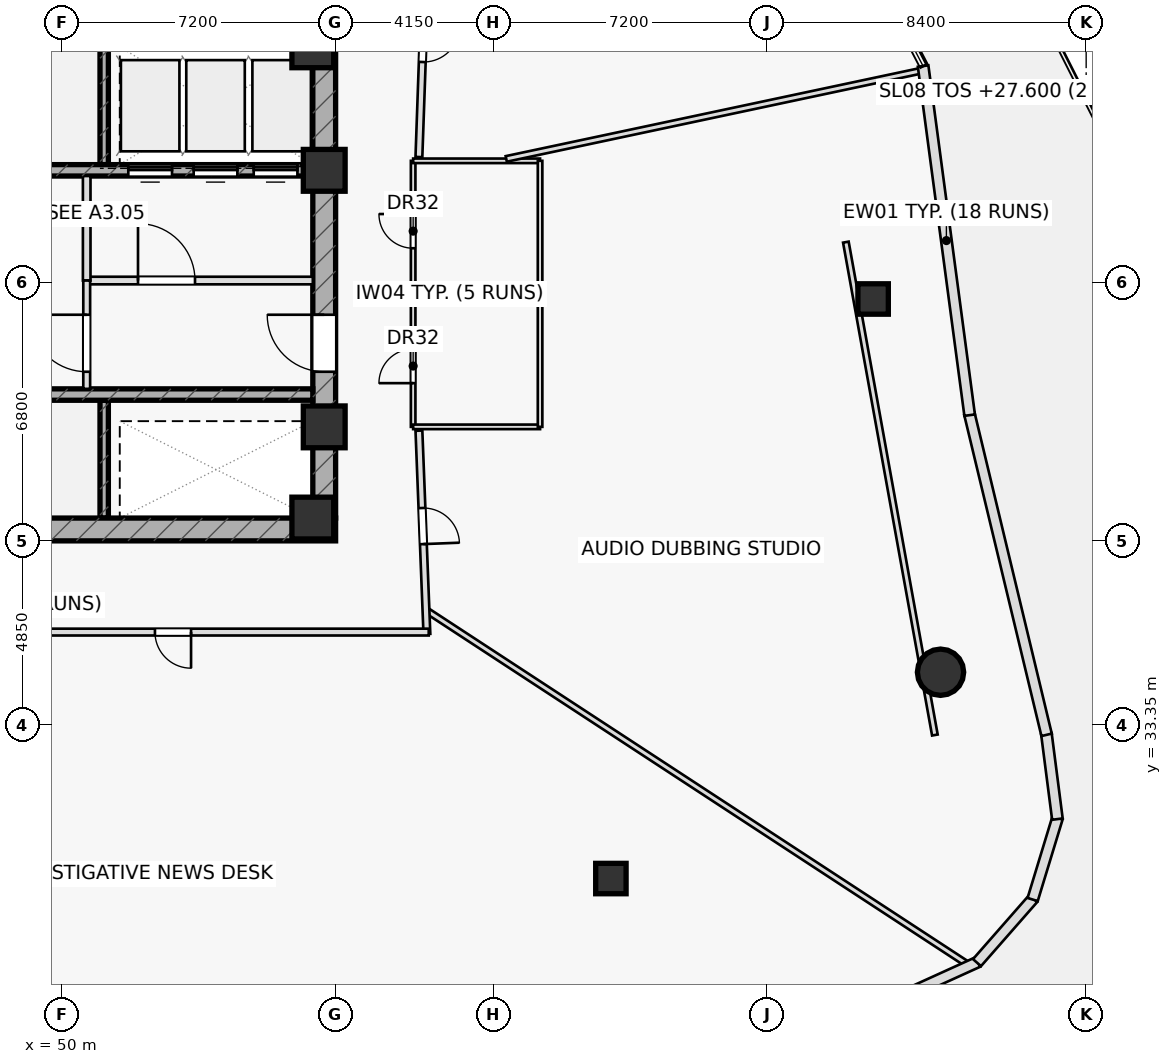
"""IFC4 building model, lengths in metres.
Left out: names, types, materials, properties, quantities, classifications, styles, units other than length and angle.
Written with IfcOpenShell. Run it as: python <this file> out.ifc"""

import sys

from ifc_helpers import new_model, si_unit, direction, frame, frame_2d, origin, origin_2d, place, context, subcontext, project, spatial, rectangle, hollow_rectangle, hollow_circle, extrude, element, fill, save


model = new_model("IFC4")
c1 = context("Model", 3, precision=1e-05, world=origin(), true_north=direction((0.0, 1.0)))
c2 = subcontext(c1, "Body", "Model", "MODEL_VIEW")
j1 = project(units=[si_unit("LENGTHUNIT", "METRE"), si_unit("PLANEANGLEUNIT", "RADIAN")], contexts=[c1])
p1 = place(None, origin())
s1 = spatial("IfcSite", under=j1, at=p1, CompositionType="ELEMENT")
p2 = place(p1, origin())
s2 = spatial("IfcBuilding", under=s1, at=p2, CompositionType="ELEMENT")
p3 = place(p2, frame((0.0, 0.0, 27.6)))
s3 = spatial("IfcBuildingStorey", under=s2, at=p3, CompositionType="ELEMENT", Elevation=27.6)
for number, where, z_axis, x_axis in (
    (1, (51.11, 48.1, 0.0), (0.0, 0.0, 1.0), (0.0, 1.0, 0.0)),
    (2, (51.11, 38.8, 0.0), (0.0, 0.0, 1.0), (0.0, 1.0, 0.0)),
):
    element("IfcWall", number, at=place(p3, frame(where, z_axis=z_axis, x_axis=x_axis)), inside=s3, PredefinedType="SHEAR", context=c2, shape_type="SweptSolid", body=[
        extrude(rectangle(XDim=3.1, YDim=0.22, at=frame_2d((1.55, 0.0))), origin(), (0.0, 0.0, 1.0), 3.6),
    ])
p4 = place(p3, frame((42.8, 38.5, 0.0), z_axis=(0.0, 0.0, 1.0), x_axis=(1.0, 0.0, 0.0)))
e3 = element("IfcWall", 3, at=p4, inside=s3, PredefinedType="SHEAR", context=c2, shape_type="SweptSolid", body=[
    extrude(rectangle(XDim=14.4, YDim=0.6, at=frame_2d((7.2, 0.0))), origin(), (0.0, 0.0, 1.0), 3.6),
])
p5 = place(p4, frame((0.88, 0.0, 0.0)))
e4 = element("IfcOpeningElement", 4, at=p5, cuts=e3, PredefinedType="OPENING", context=c2, shape_type="SweptSolid", body=[
    extrude(rectangle(XDim=1.05, YDim=2.2, at=frame_2d((0.525, 1.1))), frame((0.0, 0.31, 0.0), z_axis=(0.0, -1.0, 0.0), x_axis=(1.0, 0.0, 0.0)), (0.0, 0.0, 1.0), 0.62),
])
p6 = place(p3, frame((56.9, 38.8, 0.0), z_axis=(0.0, 0.0, 1.0), x_axis=(0.0, 1.0, 0.0)))
e5 = element("IfcWall", 5, at=p6, inside=s3, PredefinedType="SHEAR", context=c2, shape_type="SweptSolid", body=[
    extrude(rectangle(XDim=12.4, YDim=0.6, at=frame_2d((6.2, 0.0))), origin(), (0.0, 0.0, 1.0), 3.6),
])
p7 = place(p6, frame((3.85, 0.0, 0.0)))
e6 = element("IfcOpeningElement", 6, at=p7, cuts=e5, PredefinedType="OPENING", context=c2, shape_type="SweptSolid", body=[
    extrude(rectangle(XDim=1.5, YDim=2.2, at=frame_2d((0.75, 1.1))), frame((0.0, 0.31, 0.0), z_axis=(0.0, -1.0, 0.0), x_axis=(1.0, 0.0, 0.0)), (0.0, 0.0, 1.0), 0.62),
])
p8 = place(p3, frame((43.4, 47.95, 0.0), z_axis=(0.0, 0.0, 1.0), x_axis=(1.0, 0.0, 0.0)))
e7 = element("IfcWall", 7, at=p8, inside=s3, PredefinedType="SHEAR", context=c2, shape_type="SweptSolid", body=[
    extrude(rectangle(XDim=13.2, YDim=0.3, at=frame_2d((6.6, 0.0))), origin(), (0.0, 0.0, 1.0), 3.6),
])
p9 = place(p8, frame((8.345, 0.0, 0.0)))
e8 = element("IfcOpeningElement", 8, at=p9, cuts=e7, PredefinedType="OPENING", context=c2, shape_type="SweptSolid", body=[
    extrude(rectangle(XDim=1.15, YDim=2.2, at=frame_2d((0.575, 1.1))), frame((0.0, 0.16, 0.0), z_axis=(0.0, -1.0, 0.0), x_axis=(1.0, 0.0, 0.0)), (0.0, 0.0, 1.0), 0.32),
])
p10 = place(p8, frame((10.065, 0.0, 0.0)))
e9 = element("IfcOpeningElement", 9, at=p10, cuts=e7, PredefinedType="OPENING", context=c2, shape_type="SweptSolid", body=[
    extrude(rectangle(XDim=1.15, YDim=2.2, at=frame_2d((0.575, 1.1))), frame((0.0, 0.16, 0.0), z_axis=(0.0, -1.0, 0.0), x_axis=(1.0, 0.0, 0.0)), (0.0, 0.0, 1.0), 0.32),
])
p11 = place(p8, frame((11.645, 0.0, 0.0)))
e10 = element("IfcOpeningElement", 10, at=p11, cuts=e7, PredefinedType="OPENING", context=c2, shape_type="SweptSolid", body=[
    extrude(rectangle(XDim=1.15, YDim=2.2, at=frame_2d((0.575, 1.1))), frame((0.0, 0.16, 0.0), z_axis=(0.0, -1.0, 0.0), x_axis=(1.0, 0.0, 0.0)), (0.0, 0.0, 1.0), 0.32),
])
p12 = place(p3, frame((43.4, 42.05, 0.0), z_axis=(0.0, 0.0, 1.0), x_axis=(1.0, 0.0, 0.0)))
e11 = element("IfcWall", 11, at=p12, inside=s3, PredefinedType="SHEAR", context=c2, shape_type="SweptSolid", body=[
    extrude(rectangle(XDim=13.2, YDim=0.3, at=frame_2d((6.6, 0.0))), origin(), (0.0, 0.0, 1.0), 3.6),
])
for number, where, z_axis, x_axis in (
    (12, (56.9, 47.95, 0.0), (0.0, 0.0, 1.0), (1.0, 0.0, 0.0)),
    (13, (56.6, 51.2, 0.0), (0.0, 0.0, 1.0), (1.0, 0.0, 0.0)),
    (14, (56.9, 41.2, 0.0), (0.0, 0.0, 1.0), (1.0, 0.0, 0.0)),
    (15, (56.6, 38.8, 0.0), (0.0, 0.0, 1.0), (1.0, 0.0, 0.0)),
):
    element("IfcColumn", number, at=place(p3, frame(where, z_axis=z_axis, x_axis=x_axis)), inside=s3, PredefinedType="COLUMN", context=c2, shape_type="SweptSolid", body=[
        extrude(rectangle(XDim=1.1, YDim=1.1, at=origin_2d()), origin(), (0.0, 0.0, 1.0), 3.6),
    ])
p13 = place(p3, frame((64.444, 29.315, 0.0), z_axis=(0.0, 0.0, 1.0), x_axis=(1.0, 0.0, 0.0)))
e16 = element("IfcColumn", 16, at=p13, inside=s3, PredefinedType="COLUMN", context=c2, shape_type="SweptSolid", body=[
    extrude(hollow_rectangle(XDim=0.8, YDim=0.8, WallThickness=0.045, at=origin_2d()), origin(), (0.0, 0.0, 1.0), 3.6),
])
p14 = place(p3, frame((73.118, 34.744, 0.0), z_axis=(0.0, 0.0, 1.0), x_axis=(1.0, 0.0, 0.0)))
e17 = element("IfcColumn", 17, at=p14, inside=s3, PredefinedType="COLUMN", context=c2, shape_type="SweptSolid", body=[
    extrude(hollow_circle(Radius=0.61, WallThickness=0.05, at=origin_2d()), origin(), (0.0, 0.0, 1.0), 3.6),
])
p15 = place(p3, frame((71.344, 44.565, 0.0), z_axis=(0.0, 0.0, 1.0), x_axis=(1.0, 0.0, 0.0)))
e18 = element("IfcColumn", 18, at=p15, inside=s3, PredefinedType="COLUMN", context=c2, shape_type="SweptSolid", body=[
    extrude(hollow_rectangle(XDim=0.8, YDim=0.8, WallThickness=0.045, at=origin_2d()), origin(), (0.0, 0.0, 1.0), 3.6),
])
p16 = place(p3, frame((50.65, 45.05, 0.0), z_axis=(0.0, 0.0, 1.0), x_axis=(1.0, 0.0, 0.0)))
e19 = element("IfcWall", 19, at=p16, inside=s3, PredefinedType="PARTITIONING", context=c2, shape_type="SweptSolid", body=[
    extrude(rectangle(XDim=5.95, YDim=0.2, at=frame_2d((2.975, 0.0))), origin(), (0.0, 0.0, 1.0), 3.6),
])
p17 = place(p16, frame((1.35, 0.0, 0.0)))
e20 = element("IfcOpeningElement", 20, at=p17, cuts=e19, PredefinedType="OPENING", context=c2, shape_type="SweptSolid", body=[
    extrude(rectangle(XDim=1.5, YDim=2.2, at=frame_2d((0.75, 1.1))), frame((0.0, 0.11, 0.0), z_axis=(0.0, -1.0, 0.0), x_axis=(1.0, 0.0, 0.0)), (0.0, 0.0, 1.0), 0.22),
])
p18 = place(p3, frame((50.65, 45.05, 0.0), z_axis=(0.0, 0.0, 1.0), x_axis=(0.0, 1.0, 0.0)))
e21 = element("IfcWall", 21, at=p18, inside=s3, PredefinedType="PARTITIONING", context=c2, shape_type="SweptSolid", body=[
    extrude(rectangle(XDim=2.75, YDim=0.2, at=frame_2d((1.375, 0.0))), origin(), (0.0, 0.0, 1.0), 3.6),
])
p19 = place(p3, frame((50.65, 42.2, 0.0), z_axis=(0.0, 0.0, 1.0), x_axis=(0.0, 1.0, 0.0)))
e22 = element("IfcWall", 22, at=p19, inside=s3, PredefinedType="PARTITIONING", context=c2, shape_type="SweptSolid", body=[
    extrude(rectangle(XDim=2.85, YDim=0.18, at=frame_2d((1.425, 0.0))), origin(), (0.0, 0.0, 1.0), 3.6),
])
p20 = place(p19, frame((0.45, 0.0, 0.0)))
e23 = element("IfcOpeningElement", 23, at=p20, cuts=e22, PredefinedType="OPENING", context=c2, shape_type="SweptSolid", body=[
    extrude(rectangle(XDim=1.5, YDim=2.2, at=frame_2d((0.75, 1.1))), frame((0.0, 0.1, 0.0), z_axis=(0.0, -1.0, 0.0), x_axis=(1.0, 0.0, 0.0)), (0.0, 0.0, 1.0), 0.2),
])
p21 = place(p3, frame((72.969, 33.091, 0.0), z_axis=(0.0, 0.0, 1.0), x_axis=(-0.177742578179, 0.984077017261, 0.0)))
e24 = element("IfcWall", 24, at=p21, inside=s3, PredefinedType="PARTITIONING", context=c2, shape_type="SweptSolid", body=[
    extrude(rectangle(XDim=13.179, YDim=0.15, at=frame_2d((6.59, 0.0))), origin(), (0.0, 0.0, 1.0), 2.925),
])
p22 = place(p3, frame((59.24, 41.2, 0.0), z_axis=(0.0, 0.0, 1.0), x_axis=(0.0, 1.0, 0.0)))
e25 = element("IfcWall", 25, at=p22, inside=s3, PredefinedType="PARTITIONING", context=c2, shape_type="SweptSolid", body=[
    extrude(rectangle(XDim=7.0, YDim=0.12, at=frame_2d((3.5, 0.0))), origin(), (0.0, 0.0, 1.0), 3.6),
])
p23 = place(p22, frame((1.15, 0.0, 0.0)))
e26 = element("IfcOpeningElement", 26, at=p23, cuts=e25, PredefinedType="OPENING", context=c2, shape_type="SweptSolid", body=[
    extrude(rectangle(XDim=0.9, YDim=2.05, at=frame_2d((0.45, 1.025))), frame((0.0, 0.07, 0.0), z_axis=(0.0, -1.0, 0.0), x_axis=(1.0, 0.0, 0.0)), (0.0, 0.0, 1.0), 0.14),
])
p24 = place(p22, frame((4.7, 0.0, 0.0)))
e27 = element("IfcOpeningElement", 27, at=p24, cuts=e25, PredefinedType="OPENING", context=c2, shape_type="SweptSolid", body=[
    extrude(rectangle(XDim=0.9, YDim=2.05, at=frame_2d((0.45, 1.025))), frame((0.0, 0.07, 0.0), z_axis=(0.0, -1.0, 0.0), x_axis=(1.0, 0.0, 0.0)), (0.0, 0.0, 1.0), 0.14),
])
p25 = place(p3, frame((59.24, 41.2, 0.0), z_axis=(0.0, 0.0, 1.0), x_axis=(1.0, 0.0, 0.0)))
e28 = element("IfcWall", 28, at=p25, inside=s3, PredefinedType="PARTITIONING", context=c2, shape_type="SweptSolid", body=[
    extrude(rectangle(XDim=3.34, YDim=0.12, at=frame_2d((1.67, 0.0))), origin(), (0.0, 0.0, 1.0), 2.925),
])
for number, where, z_axis, x_axis in (
    (29, (59.24, 44.65, 0.0), (0.0, 0.0, 1.0), (1.0, 0.0, 0.0)),
    (30, (59.24, 48.2, 0.0), (0.0, 0.0, 1.0), (1.0, 0.0, 0.0)),
):
    element("IfcWall", number, at=place(p3, frame(where, z_axis=z_axis, x_axis=x_axis)), inside=s3, PredefinedType="PARTITIONING", context=c2, shape_type="SweptSolid", body=[
        extrude(rectangle(XDim=3.34, YDim=0.12, at=frame_2d((1.67, 0.0))), origin(), (0.0, 0.0, 1.0), 3.6),
    ])
p26 = place(p3, frame((62.58, 41.2, 0.0), z_axis=(0.0, 0.0, 1.0), x_axis=(0.0, 1.0, 0.0)))
e31 = element("IfcWall", 31, at=p26, inside=s3, PredefinedType="PARTITIONING", context=c2, shape_type="SweptSolid", body=[
    extrude(rectangle(XDim=7.0, YDim=0.12, at=frame_2d((3.5, 0.0))), origin(), (0.0, 0.0, 1.0), 3.6),
])
p27 = place(p3, frame((61.69, 48.25, 0.0), z_axis=(0.0, 0.0, 1.0), x_axis=(0.978145986239, 0.207919286276, 0.0)))
e32 = element("IfcWall", 32, at=p27, inside=s3, PredefinedType="PARTITIONING", context=c2, shape_type="SweptSolid", body=[
    extrude(rectangle(XDim=11.24, YDim=0.15, at=frame_2d((5.62, 0.0))), origin(), (0.0, 0.0, 1.0), 2.975),
])
p28 = place(p3, frame((59.577, 36.381, 0.0), z_axis=(0.0, 0.0, 1.0), x_axis=(0.83686376377, -0.547411217358, 0.0)))
e33 = element("IfcWall", 33, at=p28, inside=s3, PredefinedType="PARTITIONING", context=c2, shape_type="SweptSolid", body=[
    extrude(rectangle(XDim=17.109, YDim=0.15, at=frame_2d((8.554, 0.0))), origin(), (0.0, 0.0, 1.0), 2.975),
])
p29 = place(p3, frame((59.602, 54.25, 0.0), z_axis=(0.0, 0.0, 1.0), x_axis=(-0.035265891834, -0.999377964973, 0.0)))
e34 = element("IfcWall", 34, at=p29, inside=s3, PredefinedType="PARTITIONING", context=c2, shape_type="SweptSolid", body=[
    extrude(rectangle(XDim=5.954, YDim=0.18, at=frame_2d((2.977, 0.0))), origin(), (0.0, 0.0, 1.0), 2.925),
])
p30 = place(p29, frame((2.502, 0.0, 0.0)))
e35 = element("IfcOpeningElement", 35, at=p30, cuts=e34, PredefinedType="OPENING", context=c2, shape_type="SweptSolid", body=[
    extrude(rectangle(XDim=0.95, YDim=2.05, at=frame_2d((0.475, 1.025))), frame((0.0, 0.1, 0.0), z_axis=(0.0, -1.0, 0.0), x_axis=(1.0, 0.0, 0.0)), (0.0, 0.0, 1.0), 0.2),
])
p31 = place(p3, frame((59.392, 41.1, 0.0), z_axis=(0.0, 0.0, 1.0), x_axis=(0.03921413315, -0.999230830069, 0.0)))
e36 = element("IfcWall", 36, at=p31, inside=s3, PredefinedType="PARTITIONING", context=c2, shape_type="SweptSolid", body=[
    extrude(rectangle(XDim=5.354, YDim=0.18, at=frame_2d((2.677, 0.0))), origin(), (0.0, 0.0, 1.0), 2.925),
])
p32 = place(p31, frame((2.037, 0.0, 0.0)))
e37 = element("IfcOpeningElement", 37, at=p32, cuts=e36, PredefinedType="OPENING", context=c2, shape_type="SweptSolid", body=[
    extrude(rectangle(XDim=0.95, YDim=2.05, at=frame_2d((0.475, 1.025))), frame((0.0, 0.1, 0.0), z_axis=(0.0, -1.0, 0.0), x_axis=(1.0, 0.0, 0.0)), (0.0, 0.0, 1.0), 0.2),
])
p33 = place(p3, frame((59.65, 35.8, 0.0), z_axis=(0.0, 0.0, 1.0), x_axis=(-1.0, 0.0, 0.0)))
e38 = element("IfcWall", 38, at=p33, inside=s3, PredefinedType="PARTITIONING", context=c2, shape_type="SweptSolid", body=[
    extrude(rectangle(XDim=22.15, YDim=0.18, at=frame_2d((11.075, 0.0))), origin(), (0.0, 0.0, 1.0), 2.925),
])
p34 = place(p33, frame((6.254, 0.0, 0.0)))
e39 = element("IfcOpeningElement", 39, at=p34, cuts=e38, PredefinedType="OPENING", context=c2, shape_type="SweptSolid", body=[
    extrude(rectangle(XDim=0.95, YDim=2.05, at=frame_2d((0.475, 1.025))), frame((0.0, 0.1, 0.0), z_axis=(0.0, -1.0, 0.0), x_axis=(1.0, 0.0, 0.0)), (0.0, 0.0, 1.0), 0.2),
])
p35 = place(p33, frame((15.103, 0.0, 0.0)))
e40 = element("IfcOpeningElement", 40, at=p35, cuts=e38, PredefinedType="OPENING", context=c2, shape_type="SweptSolid", body=[
    extrude(rectangle(XDim=0.95, YDim=2.05, at=frame_2d((0.475, 1.025))), frame((0.0, 0.1, 0.0), z_axis=(0.0, -1.0, 0.0), x_axis=(1.0, 0.0, 0.0)), (0.0, 0.0, 1.0), 0.2),
])
p36 = place(p3, frame((72.049, 26.187, 0.0), z_axis=(0.0, 0.0, 1.0), x_axis=(0.910281161634, 0.413990587786, 0.0)))
e41 = element("IfcWall", 41, at=p36, inside=s3, PredefinedType="STANDARD", context=c2, shape_type="SweptSolid", body=[
    extrude(rectangle(XDim=2.255, YDim=0.28, at=frame_2d((1.127, 0.0))), origin(), (0.0, 0.0, 1.0), 3.6),
])
p37 = place(p3, frame((74.077, 27.103, 0.0), z_axis=(0.0, 0.0, 1.0), x_axis=(0.659328805879, 0.751854723825, 0.0)))
e42 = element("IfcWall", 42, at=p37, inside=s3, PredefinedType="STANDARD", context=c2, shape_type="SweptSolid", body=[
    extrude(rectangle(XDim=2.243, YDim=0.28, at=frame_2d((1.122, 0.0))), origin(), (0.0, 0.0, 1.0), 3.6),
])
p38 = place(p3, frame((75.542, 28.763, 0.0), z_axis=(0.0, 0.0, 1.0), x_axis=(0.291529800595, 0.95656174676, 0.0)))
e43 = element("IfcWall", 43, at=p38, inside=s3, PredefinedType="STANDARD", context=c2, shape_type="SweptSolid", body=[
    extrude(rectangle(XDim=2.243, YDim=0.28, at=frame_2d((1.121, 0.0))), origin(), (0.0, 0.0, 1.0), 3.6),
])
p39 = place(p3, frame((76.193, 30.879, 0.0), z_axis=(0.0, 0.0, 1.0), x_axis=(-0.127920045856, 0.991784483579, 0.0)))
e44 = element("IfcWall", 44, at=p39, inside=s3, PredefinedType="STANDARD", context=c2, shape_type="SweptSolid", body=[
    extrude(rectangle(XDim=2.265, YDim=0.28, at=frame_2d((1.133, 0.0))), origin(), (0.0, 0.0, 1.0), 3.6),
])
p40 = place(p3, frame((75.909, 33.096, 0.0), z_axis=(0.0, 0.0, 1.0), x_axis=(-0.233851528727, 0.972272319112, 0.0)))
e45 = element("IfcWall", 45, at=p40, inside=s3, PredefinedType="STANDARD", context=c2, shape_type="SweptSolid", body=[
    extrude(rectangle(XDim=8.682, YDim=0.28, at=frame_2d((4.341, 0.0))), origin(), (0.0, 0.0, 1.0), 3.6),
])
p41 = place(p3, frame((73.884, 41.508, 0.0), z_axis=(0.0, 0.0, 1.0), x_axis=(-0.132172348327, 0.991226750213, 0.0)))
e46 = element("IfcWall", 46, at=p41, inside=s3, PredefinedType="STANDARD", context=c2, shape_type="SweptSolid", body=[
    extrude(rectangle(XDim=9.267, YDim=0.28, at=frame_2d((4.634, 0.0))), origin(), (0.0, 0.0, 1.0), 3.6),
])
p42 = place(p7, origin())
e47 = element("IfcDoor", 47, at=p42, inside=s3, OperationType="SINGLE_SWING_RIGHT", PredefinedType="DOOR", context=c2, shape_type="SweptSolid", body=[
    extrude(rectangle(XDim=1.5, YDim=2.2, at=frame_2d((0.75, 1.1))), frame((0.0, 0.025, 0.0), z_axis=(0.0, -1.0, 0.0), x_axis=(1.0, 0.0, 0.0)), (0.0, 0.0, 1.0), 0.05),
])
fill(e6, e47)
p43 = place(p17, origin())
e48 = element("IfcDoor", 48, at=p43, inside=s3, OperationType="SINGLE_SWING_LEFT", PredefinedType="DOOR", context=c2, shape_type="SweptSolid", body=[
    extrude(rectangle(XDim=1.5, YDim=2.2, at=frame_2d((0.75, 1.1))), frame((0.0, 0.025, 0.0), z_axis=(0.0, -1.0, 0.0), x_axis=(1.0, 0.0, 0.0)), (0.0, 0.0, 1.0), 0.05),
])
fill(e20, e48)
p44 = place(p20, origin())
e49 = element("IfcDoor", 49, at=p44, inside=s3, OperationType="SINGLE_SWING_RIGHT", PredefinedType="DOOR", context=c2, shape_type="SweptSolid", body=[
    extrude(rectangle(XDim=1.5, YDim=2.2, at=frame_2d((0.75, 1.1))), frame((0.0, 0.025, 0.0), z_axis=(0.0, -1.0, 0.0), x_axis=(1.0, 0.0, 0.0)), (0.0, 0.0, 1.0), 0.05),
])
fill(e23, e49)
p45 = place(p23, origin())
e50 = element("IfcDoor", 50, at=p45, inside=s3, OperationType="SINGLE_SWING_LEFT", PredefinedType="DOOR", context=c2, shape_type="SweptSolid", body=[
    extrude(rectangle(XDim=0.9, YDim=2.05, at=frame_2d((0.45, 1.025))), frame((0.0, 0.025, 0.0), z_axis=(0.0, -1.0, 0.0), x_axis=(1.0, 0.0, 0.0)), (0.0, 0.0, 1.0), 0.05),
])
fill(e26, e50)
p46 = place(p24, origin())
e51 = element("IfcDoor", 51, at=p46, inside=s3, OperationType="SINGLE_SWING_RIGHT", PredefinedType="DOOR", context=c2, shape_type="SweptSolid", body=[
    extrude(rectangle(XDim=0.9, YDim=2.05, at=frame_2d((0.45, 1.025))), frame((0.0, 0.025, 0.0), z_axis=(0.0, -1.0, 0.0), x_axis=(1.0, 0.0, 0.0)), (0.0, 0.0, 1.0), 0.05),
])
fill(e27, e51)
p47 = place(p30, origin())
e52 = element("IfcDoor", 52, at=p47, inside=s3, OperationType="SINGLE_SWING_LEFT", PredefinedType="DOOR", context=c2, shape_type="SweptSolid", body=[
    extrude(rectangle(XDim=0.95, YDim=2.05, at=frame_2d((0.475, 1.025))), frame((0.0, 0.025, 0.0), z_axis=(0.0, -1.0, 0.0), x_axis=(1.0, 0.0, 0.0)), (0.0, 0.0, 1.0), 0.05),
])
fill(e35, e52)
p48 = place(p32, origin())
e53 = element("IfcDoor", 53, at=p48, inside=s3, OperationType="SINGLE_SWING_RIGHT", PredefinedType="DOOR", context=c2, shape_type="SweptSolid", body=[
    extrude(rectangle(XDim=0.95, YDim=2.05, at=frame_2d((0.475, 1.025))), frame((0.0, 0.025, 0.0), z_axis=(0.0, -1.0, 0.0), x_axis=(1.0, 0.0, 0.0)), (0.0, 0.0, 1.0), 0.05),
])
fill(e37, e53)
p49 = place(p34, origin())
e54 = element("IfcDoor", 54, at=p49, inside=s3, OperationType="SINGLE_SWING_LEFT", PredefinedType="DOOR", context=c2, shape_type="SweptSolid", body=[
    extrude(rectangle(XDim=0.95, YDim=2.05, at=frame_2d((0.475, 1.025))), frame((0.0, 0.025, 0.0), z_axis=(0.0, -1.0, 0.0), x_axis=(1.0, 0.0, 0.0)), (0.0, 0.0, 1.0), 0.05),
])
fill(e39, e54)
p50 = place(p9, origin())
e55 = element("IfcDoor", 55, at=p50, inside=s3, OperationType="SLIDING_TO_LEFT", PredefinedType="DOOR", context=c2, shape_type="SweptSolid", body=[
    extrude(rectangle(XDim=1.15, YDim=2.2, at=frame_2d((0.575, 1.1))), frame((0.0, 0.025, 0.0), z_axis=(0.0, -1.0, 0.0), x_axis=(1.0, 0.0, 0.0)), (0.0, 0.0, 1.0), 0.05),
])
fill(e8, e55)
p51 = place(p10, origin())
e56 = element("IfcDoor", 56, at=p51, inside=s3, OperationType="SLIDING_TO_LEFT", PredefinedType="DOOR", context=c2, shape_type="SweptSolid", body=[
    extrude(rectangle(XDim=1.15, YDim=2.2, at=frame_2d((0.575, 1.1))), frame((0.0, 0.025, 0.0), z_axis=(0.0, -1.0, 0.0), x_axis=(1.0, 0.0, 0.0)), (0.0, 0.0, 1.0), 0.05),
])
fill(e9, e56)
p52 = place(p11, origin())
e57 = element("IfcDoor", 57, at=p52, inside=s3, OperationType="SLIDING_TO_LEFT", PredefinedType="DOOR", context=c2, shape_type="SweptSolid", body=[
    extrude(rectangle(XDim=1.15, YDim=2.2, at=frame_2d((0.575, 1.1))), frame((0.0, 0.025, 0.0), z_axis=(0.0, -1.0, 0.0), x_axis=(1.0, 0.0, 0.0)), (0.0, 0.0, 1.0), 0.05),
])
fill(e10, e57)
save(model, sys.argv[1])
